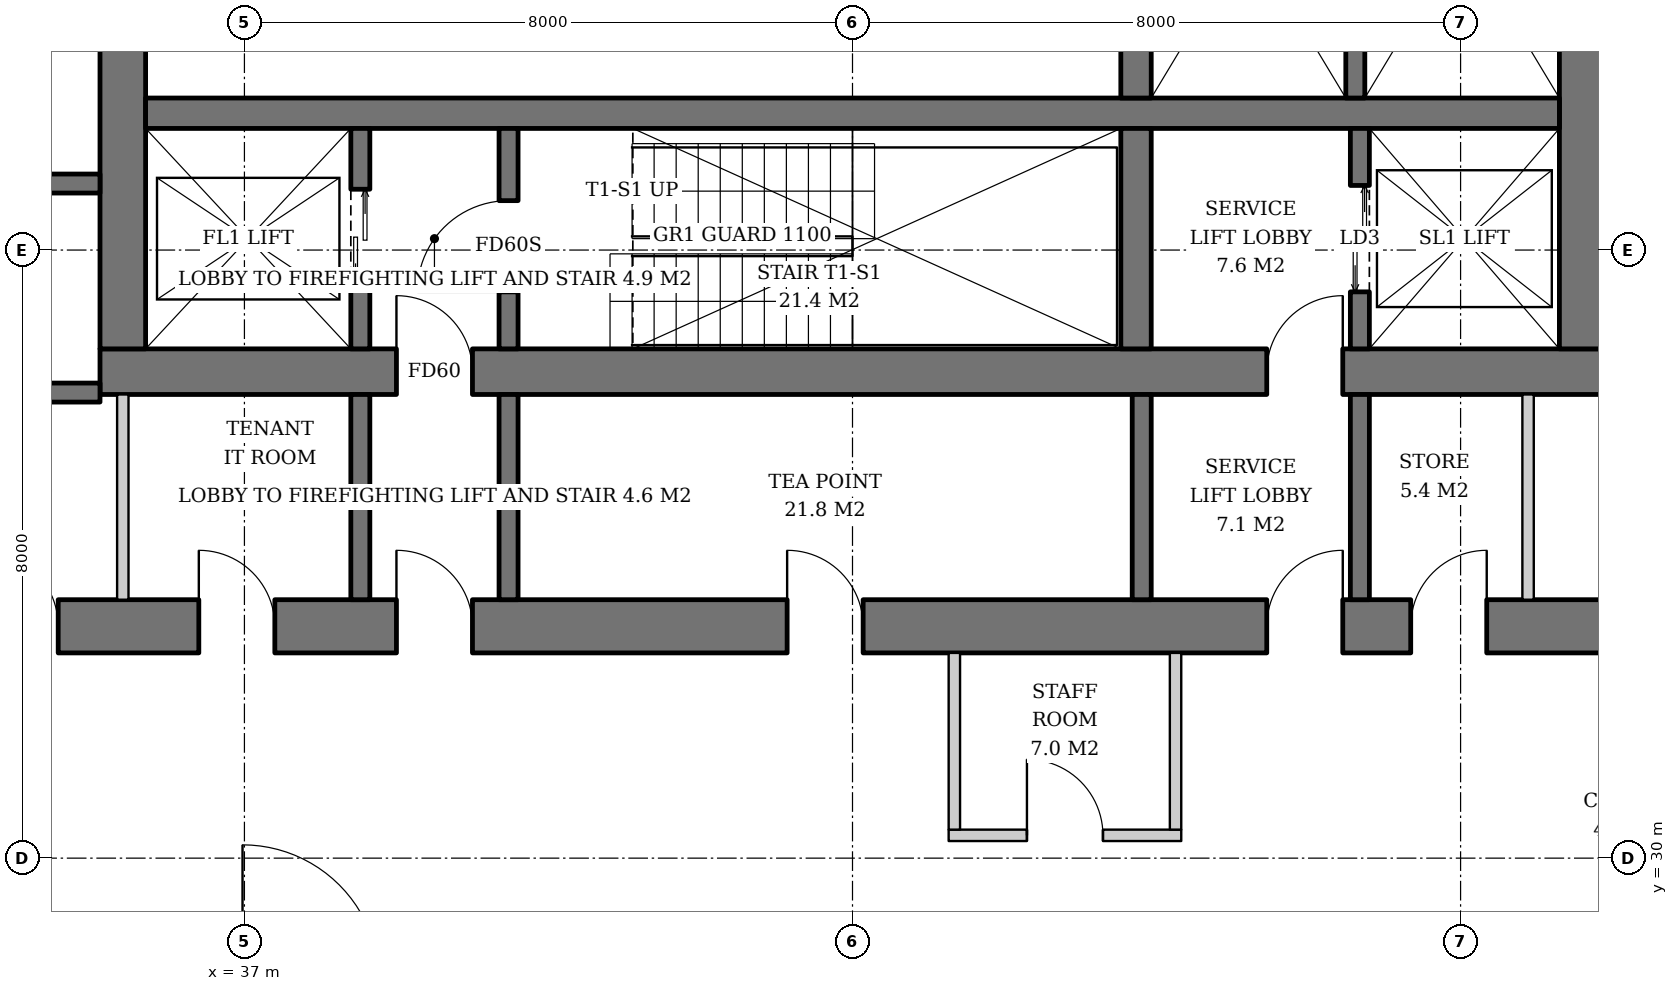
"""IFC4 building model, lengths in metres.
Left out: names, types, materials, properties, quantities, classifications, styles, units other than length and angle.
Written with IfcOpenShell. Run it as: python <this file> out.ifc"""

import sys

from ifc_helpers import new_model, si_unit, direction, frame, frame_2d, origin, place, context, subcontext, project, spatial, rectangle, extrude, element, fill, save


model = new_model("IFC4")
c1 = context("Model", 3, precision=1e-05, world=origin(), true_north=direction((0.0, 1.0)))
c2 = subcontext(c1, "Body", "Model", "MODEL_VIEW")
j1 = project(units=[si_unit("LENGTHUNIT", "METRE"), si_unit("PLANEANGLEUNIT", "RADIAN")], contexts=[c1])
p1 = place(None, origin())
s1 = spatial("IfcSite", under=j1, at=p1, CompositionType="ELEMENT")
p2 = place(p1, origin())
s2 = spatial("IfcBuilding", under=s1, at=p2, CompositionType="ELEMENT")
p3 = place(p2, frame((0.0, 0.0, 127.4)))
s3 = spatial("IfcBuildingStorey", under=s2, at=p3, CompositionType="ELEMENT", Elevation=127.4)
p4 = place(p3, frame((35.1, 36.4, 0.0), z_axis=(0.0, 0.0, 1.0), x_axis=(1.0, 0.0, 0.0)))
e1 = element("IfcWall", 1, at=p4, inside=s3, PredefinedType="SHEAR", context=c2, shape_type="SweptSolid", body=[
    extrude(rectangle(XDim=19.8, YDim=0.6, at=frame_2d((9.9, 0.0))), origin(), (0.0, 0.0, 1.0), 3.8),
])
p5 = place(p4, frame((3.9, 0.0, 0.0)))
e2 = element("IfcOpeningElement", 2, at=p5, cuts=e1, PredefinedType="OPENING", context=c2, shape_type="SweptSolid", body=[
    extrude(rectangle(XDim=1.0, YDim=2.1, at=frame_2d((0.5, 1.05))), frame((0.0, 0.31, 0.0), z_axis=(0.0, -1.0, 0.0), x_axis=(1.0, 0.0, 0.0)), (0.0, 0.0, 1.0), 0.62),
])
p6 = place(p4, frame((15.35, 0.0, 0.0)))
e3 = element("IfcOpeningElement", 3, at=p6, cuts=e1, PredefinedType="OPENING", context=c2, shape_type="SweptSolid", body=[
    extrude(rectangle(XDim=1.0, YDim=2.1, at=frame_2d((0.5, 1.05))), frame((0.0, 0.31, 0.0), z_axis=(0.0, -1.0, 0.0), x_axis=(1.0, 0.0, 0.0)), (0.0, 0.0, 1.0), 0.62),
])
p7 = place(p3, frame((35.4, 36.7, 0.0), z_axis=(0.0, 0.0, 1.0), x_axis=(0.0, 1.0, 0.0)))
e4 = element("IfcWall", 4, at=p7, inside=s3, PredefinedType="SHEAR", context=c2, shape_type="SweptSolid", body=[
    extrude(rectangle(XDim=18.6, YDim=0.6, at=frame_2d((9.3, 0.0))), origin(), (0.0, 0.0, 1.0), 3.8),
])
p8 = place(p7, frame((8.4, 0.0, 0.0)))
e5 = element("IfcOpeningElement", 5, at=p8, cuts=e4, PredefinedType="OPENING", context=c2, shape_type="SweptSolid", body=[
    extrude(rectangle(XDim=1.8, YDim=2.4, at=frame_2d((0.9, 1.2))), frame((0.0, 0.31, 0.0), z_axis=(0.0, -1.0, 0.0), x_axis=(1.0, 0.0, 0.0)), (0.0, 0.0, 1.0), 0.62),
])
p9 = place(p3, frame((54.6, 36.7, 0.0), z_axis=(0.0, 0.0, 1.0), x_axis=(0.0, 1.0, 0.0)))
e6 = element("IfcWall", 6, at=p9, inside=s3, PredefinedType="SHEAR", context=c2, shape_type="SweptSolid", body=[
    extrude(rectangle(XDim=18.6, YDim=0.6, at=frame_2d((9.3, 0.0))), origin(), (0.0, 0.0, 1.0), 3.8),
])
p10 = place(p9, frame((8.4, 0.0, 0.0)))
e7 = element("IfcOpeningElement", 7, at=p10, cuts=e6, PredefinedType="OPENING", context=c2, shape_type="SweptSolid", body=[
    extrude(rectangle(XDim=1.8, YDim=2.4, at=frame_2d((0.9, 1.2))), frame((0.0, 0.31, 0.0), z_axis=(0.0, -1.0, 0.0), x_axis=(1.0, 0.0, 0.0)), (0.0, 0.0, 1.0), 0.62),
])
p11 = place(p3, frame((31.7, 33.05, 0.0), z_axis=(0.0, 0.0, 1.0), x_axis=(1.0, 0.0, 0.0)))
e8 = element("IfcWall", 8, at=p11, inside=s3, PredefinedType="SHEAR", context=c2, shape_type="SweptSolid", body=[
    extrude(rectangle(XDim=26.6, YDim=0.7, at=frame_2d((13.3, 0.0))), origin(), (0.0, 0.0, 1.0), 3.8),
])
p12 = place(p11, frame((7.3, 0.0, 0.0)))
e9 = element("IfcOpeningElement", 9, at=p12, cuts=e8, PredefinedType="OPENING", context=c2, shape_type="SweptSolid", body=[
    extrude(rectangle(XDim=1.0, YDim=2.1, at=frame_2d((0.5, 1.05))), frame((0.0, 0.36, 0.0), z_axis=(0.0, -1.0, 0.0), x_axis=(1.0, 0.0, 0.0)), (0.0, 0.0, 1.0), 0.72),
])
p13 = place(p11, frame((18.75, 0.0, 0.0)))
e10 = element("IfcOpeningElement", 10, at=p13, cuts=e8, PredefinedType="OPENING", context=c2, shape_type="SweptSolid", body=[
    extrude(rectangle(XDim=1.0, YDim=2.1, at=frame_2d((0.5, 1.05))), frame((0.0, 0.36, 0.0), z_axis=(0.0, -1.0, 0.0), x_axis=(1.0, 0.0, 0.0)), (0.0, 0.0, 1.0), 0.72),
])
p14 = place(p11, frame((1.85, 0.0, 0.0)))
e11 = element("IfcOpeningElement", 11, at=p14, cuts=e8, PredefinedType="OPENING", context=c2, shape_type="SweptSolid", body=[
    extrude(rectangle(XDim=1.0, YDim=2.1, at=frame_2d((0.5, 1.05))), frame((0.0, 0.36, 0.0), z_axis=(0.0, -1.0, 0.0), x_axis=(1.0, 0.0, 0.0)), (0.0, 0.0, 1.0), 0.72),
])
p15 = place(p11, frame((4.7, 0.0, 0.0)))
e12 = element("IfcOpeningElement", 12, at=p15, cuts=e8, PredefinedType="OPENING", context=c2, shape_type="SweptSolid", body=[
    extrude(rectangle(XDim=1.0, YDim=2.1, at=frame_2d((0.5, 1.05))), frame((0.0, 0.36, 0.0), z_axis=(0.0, -1.0, 0.0), x_axis=(1.0, 0.0, 0.0)), (0.0, 0.0, 1.0), 0.72),
])
p16 = place(p11, frame((12.44, 0.0, 0.0)))
e13 = element("IfcOpeningElement", 13, at=p16, cuts=e8, PredefinedType="OPENING", context=c2, shape_type="SweptSolid", body=[
    extrude(rectangle(XDim=1.0, YDim=2.1, at=frame_2d((0.5, 1.05))), frame((0.0, 0.36, 0.0), z_axis=(0.0, -1.0, 0.0), x_axis=(1.0, 0.0, 0.0)), (0.0, 0.0, 1.0), 0.72),
])
p17 = place(p11, frame((20.644, 0.0, 0.0)))
e14 = element("IfcOpeningElement", 14, at=p17, cuts=e8, PredefinedType="OPENING", context=c2, shape_type="SweptSolid", body=[
    extrude(rectangle(XDim=1.0, YDim=2.1, at=frame_2d((0.5, 1.05))), frame((0.0, 0.36, 0.0), z_axis=(0.0, -1.0, 0.0), x_axis=(1.0, 0.0, 0.0)), (0.0, 0.0, 1.0), 0.72),
])
p18 = place(p11, frame((23.544, 0.0, 0.0)))
e15 = element("IfcOpeningElement", 15, at=p18, cuts=e8, PredefinedType="OPENING", context=c2, shape_type="SweptSolid", body=[
    extrude(rectangle(XDim=1.0, YDim=2.1, at=frame_2d((0.5, 1.05))), frame((0.0, 0.36, 0.0), z_axis=(0.0, -1.0, 0.0), x_axis=(1.0, 0.0, 0.0)), (0.0, 0.0, 1.0), 0.72),
])
p19 = place(p3, frame((35.7, 39.8, 0.0), z_axis=(0.0, 0.0, 1.0), x_axis=(1.0, 0.0, 0.0)))
e16 = element("IfcWall", 16, at=p19, inside=s3, PredefinedType="SHEAR", context=c2, shape_type="SweptSolid", body=[
    extrude(rectangle(XDim=18.6, YDim=0.4, at=frame_2d((9.3, 0.0))), origin(), (0.0, 0.0, 1.0), 3.8),
])
p20 = place(p3, frame((48.73, 36.7, 0.0), z_axis=(0.0, 0.0, 1.0), x_axis=(0.0, 1.0, 0.0)))
e17 = element("IfcWall", 17, at=p20, inside=s3, PredefinedType="SHEAR", context=c2, shape_type="SweptSolid", body=[
    extrude(rectangle(XDim=2.9, YDim=0.4, at=frame_2d((1.45, 0.0))), origin(), (0.0, 0.0, 1.0), 3.8),
])
p21 = place(p3, frame((48.73, 40.0, 0.0), z_axis=(0.0, 0.0, 1.0), x_axis=(0.0, 1.0, 0.0)))
e18 = element("IfcWall", 18, at=p21, inside=s3, PredefinedType="SHEAR", context=c2, shape_type="SweptSolid", body=[
    extrude(rectangle(XDim=12.0, YDim=0.4, at=frame_2d((6.0, 0.0))), origin(), (0.0, 0.0, 1.0), 3.8),
])
p22 = place(p3, frame((38.525, 36.7, 0.0), z_axis=(0.0, 0.0, 1.0), x_axis=(0.0, 1.0, 0.0)))
e19 = element("IfcWall", 19, at=p22, inside=s3, PredefinedType="SHEAR", context=c2, shape_type="SweptSolid", body=[
    extrude(rectangle(XDim=2.9, YDim=0.25, at=frame_2d((1.45, 0.0))), origin(), (0.0, 0.0, 1.0), 3.8),
])
p23 = place(p22, frame((0.8, 0.0, 0.0)))
e20 = element("IfcOpeningElement", 20, at=p23, cuts=e19, PredefinedType="OPENING", context=c2, shape_type="SweptSolid", body=[
    extrude(rectangle(XDim=1.3, YDim=2.2, at=frame_2d((0.65, 1.1))), frame((0.0, 0.135, 0.0), z_axis=(0.0, -1.0, 0.0), x_axis=(1.0, 0.0, 0.0)), (0.0, 0.0, 1.0), 0.27),
])
p24 = place(p3, frame((40.475, 36.7, 0.0), z_axis=(0.0, 0.0, 1.0), x_axis=(0.0, 1.0, 0.0)))
e21 = element("IfcWall", 21, at=p24, inside=s3, PredefinedType="SHEAR", context=c2, shape_type="SweptSolid", body=[
    extrude(rectangle(XDim=2.9, YDim=0.25, at=frame_2d((1.45, 0.0))), origin(), (0.0, 0.0, 1.0), 3.8),
])
p25 = place(p24, frame((0.75, 0.0, 0.0)))
e22 = element("IfcOpeningElement", 22, at=p25, cuts=e21, PredefinedType="OPENING", context=c2, shape_type="SweptSolid", body=[
    extrude(rectangle(XDim=1.2, YDim=2.1, at=frame_2d((0.6, 1.05))), frame((0.0, 0.135, 0.0), z_axis=(0.0, -1.0, 0.0), x_axis=(1.0, 0.0, 0.0)), (0.0, 0.0, 1.0), 0.27),
])
p26 = place(p3, frame((51.675, 36.7, 0.0), z_axis=(0.0, 0.0, 1.0), x_axis=(0.0, 1.0, 0.0)))
e23 = element("IfcWall", 23, at=p26, inside=s3, PredefinedType="SHEAR", context=c2, shape_type="SweptSolid", body=[
    extrude(rectangle(XDim=2.9, YDim=0.25, at=frame_2d((1.45, 0.0))), origin(), (0.0, 0.0, 1.0), 3.8),
])
p27 = place(p26, frame((0.75, 0.0, 0.0)))
e24 = element("IfcOpeningElement", 24, at=p27, cuts=e23, PredefinedType="OPENING", context=c2, shape_type="SweptSolid", body=[
    extrude(rectangle(XDim=1.4, YDim=2.4, at=frame_2d((0.7, 1.2))), frame((0.0, 0.135, 0.0), z_axis=(0.0, -1.0, 0.0), x_axis=(1.0, 0.0, 0.0)), (0.0, 0.0, 1.0), 0.27),
])
p28 = place(p3, frame((51.615, 44.25, 0.0), z_axis=(0.0, 0.0, 1.0), x_axis=(0.0, -1.0, 0.0)))
e25 = element("IfcWall", 25, at=p28, inside=s3, PredefinedType="SHEAR", context=c2, shape_type="SweptSolid", body=[
    extrude(rectangle(XDim=4.25, YDim=0.25, at=frame_2d((2.125, 0.0))), origin(), (0.0, 0.0, 1.0), 3.8),
])
for number, where, z_axis, x_axis in (
    (26, (32.4, 36.125, 0.0), (0.0, 0.0, 1.0), (1.0, 0.0, 0.0)),
    (27, (32.4, 38.875, 0.0), (0.0, 0.0, 1.0), (1.0, 0.0, 0.0)),
):
    element("IfcWall", number, at=place(p3, frame(where, z_axis=z_axis, x_axis=x_axis)), inside=s3, PredefinedType="SHEAR", context=c2, shape_type="SweptSolid", body=[
        extrude(rectangle(XDim=2.7, YDim=0.25, at=frame_2d((1.35, 0.0))), origin(), (0.0, 0.0, 1.0), 3.8),
    ])
for number, where, z_axis, x_axis in (
    (28, (38.525, 33.4, 0.0), (0.0, 0.0, 1.0), (0.0, 1.0, 0.0)),
    (29, (40.475, 33.4, 0.0), (0.0, 0.0, 1.0), (0.0, 1.0, 0.0)),
    (30, (48.805, 33.4, 0.0), (0.0, 0.0, 1.0), (0.0, 1.0, 0.0)),
    (31, (51.675, 33.4, 0.0), (0.0, 0.0, 1.0), (0.0, 1.0, 0.0)),
):
    element("IfcWall", number, at=place(p3, frame(where, z_axis=z_axis, x_axis=x_axis)), inside=s3, PredefinedType="SOLIDWALL", context=c2, shape_type="SweptSolid", body=[
        extrude(rectangle(XDim=2.7, YDim=0.25, at=frame_2d((1.35, 0.0))), origin(), (0.0, 0.0, 1.0), 3.62),
    ])
for number, where, z_axis, x_axis in (
    (32, (35.4, 33.4, 0.0), (0.0, 0.0, 1.0), (0.0, 1.0, 0.0)),
    (33, (53.888, 33.4, 0.0), (0.0, 0.0, 1.0), (0.0, 1.0, 0.0)),
):
    element("IfcWall", number, at=place(p3, frame(where, z_axis=z_axis, x_axis=x_axis)), inside=s3, PredefinedType="SOLIDWALL", context=c2, shape_type="SweptSolid", body=[
        extrude(rectangle(XDim=2.7, YDim=0.15, at=frame_2d((1.35, 0.0))), origin(), (0.0, 0.0, 1.0), 3.62),
    ])
p29 = place(p3, frame((46.265, 30.3, 0.0), z_axis=(0.0, 0.0, 1.0), x_axis=(1.0, 0.0, 0.0)))
e34 = element("IfcWall", 34, at=p29, inside=s3, PredefinedType="PARTITIONING", context=c2, shape_type="SweptSolid", body=[
    extrude(rectangle(XDim=3.06, YDim=0.15, at=frame_2d((1.53, 0.0))), origin(), (0.0, 0.0, 1.0), 2.858),
])
p30 = place(p29, frame((1.03, 0.0, 0.0)))
e35 = element("IfcOpeningElement", 35, at=p30, cuts=e34, PredefinedType="OPENING", context=c2, shape_type="SweptSolid", body=[
    extrude(rectangle(XDim=1.0, YDim=2.1, at=frame_2d((0.5, 1.05))), frame((0.0, 0.085, 0.0), z_axis=(0.0, -1.0, 0.0), x_axis=(1.0, 0.0, 0.0)), (0.0, 0.0, 1.0), 0.17),
])
for number, where, z_axis, x_axis in (
    (36, (46.34, 32.7, 0.0), (0.0, 0.0, 1.0), (0.0, -1.0, 0.0)),
    (37, (49.25, 32.7, 0.0), (0.0, 0.0, 1.0), (0.0, -1.0, 0.0)),
):
    element("IfcWall", number, at=place(p3, frame(where, z_axis=z_axis, x_axis=x_axis)), inside=s3, PredefinedType="PARTITIONING", context=c2, shape_type="SweptSolid", body=[
        extrude(rectangle(XDim=2.325, YDim=0.15, at=frame_2d((1.163, 0.0))), origin(), (0.0, 0.0, 1.0), 3.62),
    ])
p31 = place(p23, origin())
e38 = element("IfcDoor", 38, at=p31, inside=s3, OperationType="DOUBLE_DOOR_SLIDING", PredefinedType="DOOR", context=c2, shape_type="SweptSolid", body=[
    extrude(rectangle(XDim=1.3, YDim=2.2, at=frame_2d((0.65, 1.1))), frame((0.0, 0.025, 0.0), z_axis=(0.0, -1.0, 0.0), x_axis=(1.0, 0.0, 0.0)), (0.0, 0.0, 1.0), 0.05),
])
fill(e20, e38)
p32 = place(p25, origin())
e39 = element("IfcDoor", 39, at=p32, inside=s3, OperationType="SINGLE_SWING_LEFT", PredefinedType="DOOR", context=c2, shape_type="SweptSolid", body=[
    extrude(rectangle(XDim=1.2, YDim=2.1, at=frame_2d((0.6, 1.05))), frame((0.0, 0.025, 0.0), z_axis=(0.0, -1.0, 0.0), x_axis=(1.0, 0.0, 0.0)), (0.0, 0.0, 1.0), 0.05),
])
fill(e22, e39)
p33 = place(p27, origin())
e40 = element("IfcDoor", 40, at=p33, inside=s3, OperationType="DOUBLE_DOOR_SLIDING", PredefinedType="DOOR", context=c2, shape_type="SweptSolid", body=[
    extrude(rectangle(XDim=1.4, YDim=2.4, at=frame_2d((0.7, 1.2))), frame((0.0, 0.025, 0.0), z_axis=(0.0, -1.0, 0.0), x_axis=(1.0, 0.0, 0.0)), (0.0, 0.0, 1.0), 0.05),
])
fill(e24, e40)
p34 = place(p5, origin())
e41 = element("IfcDoor", 41, at=p34, inside=s3, OperationType="SINGLE_SWING_LEFT", PredefinedType="DOOR", context=c2, shape_type="SweptSolid", body=[
    extrude(rectangle(XDim=1.0, YDim=2.1, at=frame_2d((0.5, 1.05))), frame((0.0, 0.025, 0.0), z_axis=(0.0, -1.0, 0.0), x_axis=(1.0, 0.0, 0.0)), (0.0, 0.0, 1.0), 0.05),
])
fill(e2, e41)
p35 = place(p6, origin())
e42 = element("IfcDoor", 42, at=p35, inside=s3, OperationType="SINGLE_SWING_RIGHT", PredefinedType="DOOR", context=c2, shape_type="SweptSolid", body=[
    extrude(rectangle(XDim=1.0, YDim=2.1, at=frame_2d((0.5, 1.05))), frame((0.0, 0.025, 0.0), z_axis=(0.0, -1.0, 0.0), x_axis=(1.0, 0.0, 0.0)), (0.0, 0.0, 1.0), 0.05),
])
fill(e3, e42)
p36 = place(p12, origin())
e43 = element("IfcDoor", 43, at=p36, inside=s3, OperationType="SINGLE_SWING_LEFT", PredefinedType="DOOR", context=c2, shape_type="SweptSolid", body=[
    extrude(rectangle(XDim=1.0, YDim=2.1, at=frame_2d((0.5, 1.05))), frame((0.0, 0.025, 0.0), z_axis=(0.0, -1.0, 0.0), x_axis=(1.0, 0.0, 0.0)), (0.0, 0.0, 1.0), 0.05),
])
fill(e9, e43)
p37 = place(p13, origin())
e44 = element("IfcDoor", 44, at=p37, inside=s3, OperationType="SINGLE_SWING_RIGHT", PredefinedType="DOOR", context=c2, shape_type="SweptSolid", body=[
    extrude(rectangle(XDim=1.0, YDim=2.1, at=frame_2d((0.5, 1.05))), frame((0.0, 0.025, 0.0), z_axis=(0.0, -1.0, 0.0), x_axis=(1.0, 0.0, 0.0)), (0.0, 0.0, 1.0), 0.05),
])
fill(e10, e44)
p38 = place(p14, origin())
e45 = element("IfcDoor", 45, at=p38, inside=s3, OperationType="SINGLE_SWING_LEFT", PredefinedType="DOOR", context=c2, shape_type="SweptSolid", body=[
    extrude(rectangle(XDim=1.0, YDim=2.1, at=frame_2d((0.5, 1.05))), frame((0.0, 0.34, 0.0), z_axis=(0.0, -1.0, 0.0), x_axis=(1.0, 0.0, 0.0)), (0.0, 0.0, 1.0), 0.05),
])
fill(e11, e45)
p39 = place(p15, origin())
e46 = element("IfcDoor", 46, at=p39, inside=s3, OperationType="SINGLE_SWING_LEFT", PredefinedType="DOOR", context=c2, shape_type="SweptSolid", body=[
    extrude(rectangle(XDim=1.0, YDim=2.1, at=frame_2d((0.5, 1.05))), frame((0.0, 0.34, 0.0), z_axis=(0.0, -1.0, 0.0), x_axis=(1.0, 0.0, 0.0)), (0.0, 0.0, 1.0), 0.05),
])
fill(e12, e46)
p40 = place(p16, origin())
e47 = element("IfcDoor", 47, at=p40, inside=s3, OperationType="SINGLE_SWING_LEFT", PredefinedType="DOOR", context=c2, shape_type="SweptSolid", body=[
    extrude(rectangle(XDim=1.0, YDim=2.1, at=frame_2d((0.5, 1.05))), frame((0.0, 0.34, 0.0), z_axis=(0.0, -1.0, 0.0), x_axis=(1.0, 0.0, 0.0)), (0.0, 0.0, 1.0), 0.05),
])
fill(e13, e47)
p41 = place(p17, origin())
e48 = element("IfcDoor", 48, at=p41, inside=s3, OperationType="SINGLE_SWING_RIGHT", PredefinedType="DOOR", context=c2, shape_type="SweptSolid", body=[
    extrude(rectangle(XDim=1.0, YDim=2.1, at=frame_2d((0.5, 1.05))), frame((0.0, 0.34, 0.0), z_axis=(0.0, -1.0, 0.0), x_axis=(1.0, 0.0, 0.0)), (0.0, 0.0, 1.0), 0.05),
])
fill(e14, e48)
p42 = place(p30, origin())
e49 = element("IfcDoor", 49, at=p42, inside=s3, OperationType="SINGLE_SWING_LEFT", PredefinedType="DOOR", context=c2, shape_type="SweptSolid", body=[
    extrude(rectangle(XDim=1.0, YDim=2.1, at=frame_2d((0.5, 1.05))), frame((0.0, 0.025, 0.0), z_axis=(0.0, -1.0, 0.0), x_axis=(1.0, 0.0, 0.0)), (0.0, 0.0, 1.0), 0.05),
])
fill(e35, e49)
save(model, sys.argv[1])
